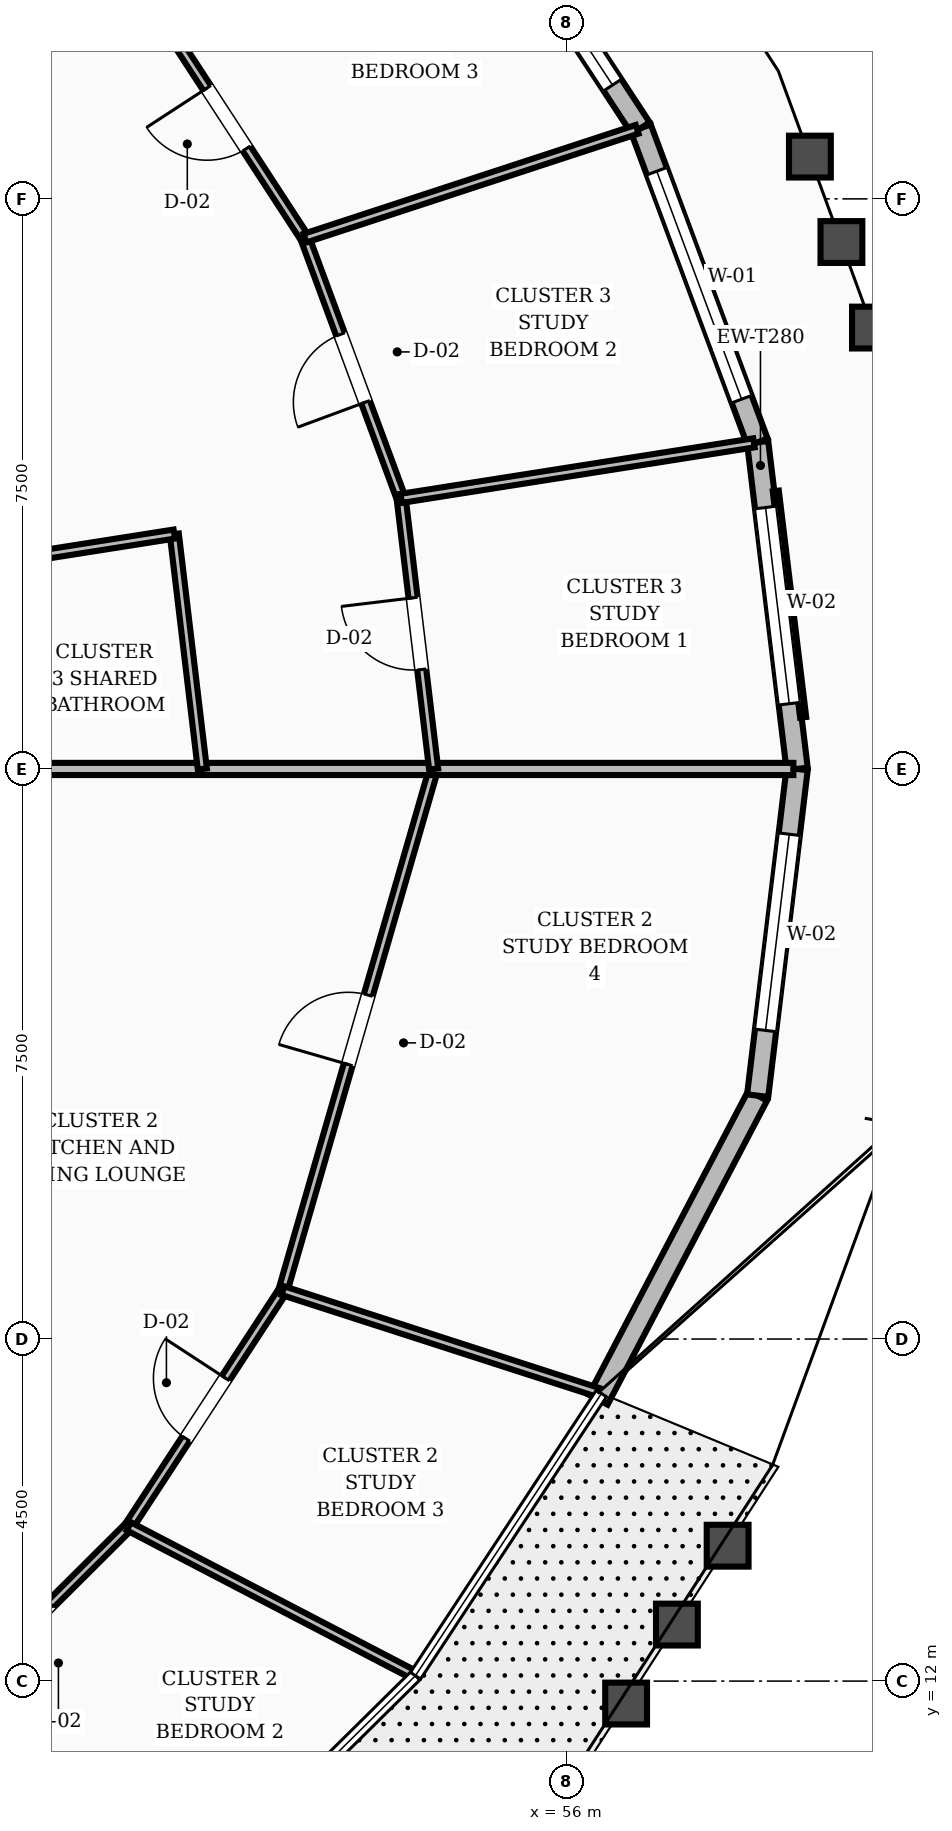
"""IFC4 building model, lengths in metres.
Left out: names, types, materials, properties, quantities, classifications, styles, units other than length and angle.
Written with IfcOpenShell. Run it as: python <this file> out.ifc"""

import sys

from ifc_helpers import new_model, si_unit, direction, frame, frame_2d, origin, place, context, subcontext, project, spatial, rectangle, extrude, element, fill, save


model = new_model("IFC4")
c1 = context("Model", 3, precision=1e-05, world=origin(), true_north=direction((0.0, 1.0)))
c2 = subcontext(c1, "Body", "Model", "MODEL_VIEW")
j1 = project(units=[si_unit("LENGTHUNIT", "METRE"), si_unit("PLANEANGLEUNIT", "RADIAN")], contexts=[c1])
p1 = place(None, origin())
s1 = spatial("IfcSite", under=j1, at=p1, CompositionType="ELEMENT")
p2 = place(p1, origin())
s2 = spatial("IfcBuilding", under=s1, at=p2, CompositionType="ELEMENT")
p3 = place(p2, frame((0.0, 0.0, 77.2)))
s3 = spatial("IfcBuildingStorey", under=s2, at=p3, CompositionType="ELEMENT", Elevation=77.2)
p4 = place(p3, frame((59.031, 24.0, 0.0), z_axis=(0.0, 0.0, 1.0), x_axis=(-0.119945698674, 0.992780453761, 0.0)))
e1 = element("IfcWall", 1, at=p4, inside=s3, PredefinedType="STANDARD", context=c2, shape_type="SweptSolid", body=[
    extrude(rectangle(XDim=4.329, YDim=0.28, at=frame_2d((2.165, 0.0))), origin(), (0.0, 0.0, 1.0), 2.71),
])
p5 = place(p4, frame((0.865, 0.0, 0.8)))
e2 = element("IfcOpeningElement", 2, at=p5, cuts=e1, PredefinedType="OPENING", context=c2, shape_type="SweptSolid", body=[
    extrude(rectangle(XDim=2.6, YDim=1.65, at=frame_2d((1.3, 0.825))), frame((0.0, 0.15, 0.0), z_axis=(0.0, -1.0, 0.0), x_axis=(1.0, 0.0, 0.0)), (0.0, 0.0, 1.0), 0.3),
])
p6 = place(p3, frame((58.511, 28.298, 0.0), z_axis=(0.0, 0.0, 1.0), x_axis=(-0.348859248306, 0.93717513031, 0.0)))
e3 = element("IfcWall", 3, at=p6, inside=s3, PredefinedType="STANDARD", context=c2, shape_type="SweptSolid", body=[
    extrude(rectangle(XDim=4.41, YDim=0.28, at=frame_2d((2.205, 0.0))), origin(), (0.0, 0.0, 1.0), 2.71),
])
p7 = place(p6, frame((0.605, 0.0, 0.8)))
e4 = element("IfcOpeningElement", 4, at=p7, cuts=e3, PredefinedType="OPENING", context=c2, shape_type="SweptSolid", body=[
    extrude(rectangle(XDim=3.2, YDim=1.65, at=frame_2d((1.6, 0.825))), frame((0.0, 0.15, 0.0), z_axis=(0.0, -1.0, 0.0), x_axis=(1.0, 0.0, 0.0)), (0.0, 0.0, 1.0), 0.3),
])
p8 = place(p3, frame((56.973, 32.431, 0.0), z_axis=(0.0, 0.0, 1.0), x_axis=(-0.548388300237, 0.836223817027, 0.0)))
e5 = element("IfcWall", 5, at=p8, inside=s3, PredefinedType="STANDARD", context=c2, shape_type="SweptSolid", body=[
    extrude(rectangle(XDim=4.555, YDim=0.28, at=frame_2d((2.277, 0.0))), origin(), (0.0, 0.0, 1.0), 2.71),
])
p9 = place(p8, frame((0.677, 0.0, 0.8)))
e6 = element("IfcOpeningElement", 6, at=p9, cuts=e5, PredefinedType="OPENING", context=c2, shape_type="SweptSolid", body=[
    extrude(rectangle(XDim=3.2, YDim=1.65, at=frame_2d((1.6, 0.825))), frame((0.0, 0.15, 0.0), z_axis=(0.0, -1.0, 0.0), x_axis=(1.0, 0.0, 0.0)), (0.0, 0.0, 1.0), 0.3),
])
p10 = place(p3, frame((56.413, 15.702, 0.0), z_axis=(0.0, 0.0, 1.0), x_axis=(0.46457646391, 0.885533008521, 0.0)))
e7 = element("IfcWall", 7, at=p10, inside=s3, PredefinedType="STANDARD", context=c2, shape_type="SweptSolid", body=[
    extrude(rectangle(XDim=4.517, YDim=0.28, at=frame_2d((2.258, 0.0))), origin(), (0.0, 0.0, 1.0), 2.71),
])
p11 = place(p3, frame((58.511, 19.702, 0.0), z_axis=(0.0, 0.0, 1.0), x_axis=(0.119945698674, 0.992780453761, 0.0)))
e8 = element("IfcWall", 8, at=p11, inside=s3, PredefinedType="STANDARD", context=c2, shape_type="SweptSolid", body=[
    extrude(rectangle(XDim=4.329, YDim=0.28, at=frame_2d((2.165, 0.0))), origin(), (0.0, 0.0, 1.0), 2.71),
])
p12 = place(p11, frame((0.865, 0.0, 0.8)))
e9 = element("IfcOpeningElement", 9, at=p12, cuts=e8, PredefinedType="OPENING", context=c2, shape_type="SweptSolid", body=[
    extrude(rectangle(XDim=2.6, YDim=1.65, at=frame_2d((1.3, 0.825))), frame((0.0, 0.15, 0.0), z_axis=(0.0, -1.0, 0.0), x_axis=(1.0, 0.0, 0.0)), (0.0, 0.0, 1.0), 0.3),
])
p13 = place(p3, frame((47.51, 11.318, 0.0), z_axis=(0.0, 0.0, 1.0), x_axis=(0.708405354772, 0.70580581843, 0.0)))
e10 = element("IfcWall", 10, at=p13, inside=s3, PredefinedType="PARTITIONING", context=c2, shape_type="SweptSolid", body=[
    extrude(rectangle(XDim=3.851, YDim=0.12, at=frame_2d((1.925, 0.0))), origin(), (0.0, 0.0, 1.0), 2.71),
])
p14 = place(p13, frame((1.45, 0.0, 0.0)))
e11 = element("IfcOpeningElement", 11, at=p14, cuts=e10, PredefinedType="OPENING", context=c2, shape_type="SweptSolid", body=[
    extrude(rectangle(XDim=0.95, YDim=2.1, at=frame_2d((0.475, 1.05))), frame((0.0, 0.07, 0.0), z_axis=(0.0, -1.0, 0.0), x_axis=(1.0, 0.0, 0.0)), (0.0, 0.0, 1.0), 0.14),
])
p15 = place(p3, frame((47.51, 11.318, 0.0), z_axis=(0.0, 0.0, 1.0), x_axis=(0.788634929873, -0.614861730297, 0.0)))
e12 = element("IfcWall", 12, at=p15, inside=s3, PredefinedType="PARTITIONING", context=c2, shape_type="SweptSolid", body=[
    extrude(rectangle(XDim=4.017, YDim=0.12, at=frame_2d((2.008, 0.0))), origin(), (0.0, 0.0, 1.0), 2.71),
])
p16 = place(p3, frame((50.238, 14.036, 0.0), z_axis=(0.0, 0.0, 1.0), x_axis=(0.547210297377, 0.836995155568, 0.0)))
e13 = element("IfcWall", 13, at=p16, inside=s3, PredefinedType="PARTITIONING", context=c2, shape_type="SweptSolid", body=[
    extrude(rectangle(XDim=3.704, YDim=0.12, at=frame_2d((1.852, 0.0))), origin(), (0.0, 0.0, 1.0), 2.71),
])
p17 = place(p16, frame((1.377, 0.0, 0.0)))
e14 = element("IfcOpeningElement", 14, at=p17, cuts=e13, PredefinedType="OPENING", context=c2, shape_type="SweptSolid", body=[
    extrude(rectangle(XDim=0.95, YDim=2.1, at=frame_2d((0.475, 1.05))), frame((0.0, 0.07, 0.0), z_axis=(0.0, -1.0, 0.0), x_axis=(1.0, 0.0, 0.0)), (0.0, 0.0, 1.0), 0.14),
])
p18 = place(p3, frame((50.238, 14.036, 0.0), z_axis=(0.0, 0.0, 1.0), x_axis=(0.886891273175, -0.461978213303, 0.0)))
e15 = element("IfcWall", 15, at=p18, inside=s3, PredefinedType="PARTITIONING", context=c2, shape_type="SweptSolid", body=[
    extrude(rectangle(XDim=4.202, YDim=0.12, at=frame_2d((2.101, 0.0))), origin(), (0.0, 0.0, 1.0), 2.71),
])
p19 = place(p3, frame((52.265, 17.137, 0.0), z_axis=(0.0, 0.0, 1.0), x_axis=(0.277595025379, 0.960698184595, 0.0)))
e16 = element("IfcWall", 16, at=p19, inside=s3, PredefinedType="PARTITIONING", context=c2, shape_type="SweptSolid", body=[
    extrude(rectangle(XDim=7.144, YDim=0.12, at=frame_2d((3.572, 0.0))), origin(), (0.0, 0.0, 1.0), 2.71),
])
p20 = place(p19, frame((3.097, 0.0, 0.0)))
e17 = element("IfcOpeningElement", 17, at=p20, cuts=e16, PredefinedType="OPENING", context=c2, shape_type="SweptSolid", body=[
    extrude(rectangle(XDim=0.95, YDim=2.1, at=frame_2d((0.475, 1.05))), frame((0.0, 0.07, 0.0), z_axis=(0.0, -1.0, 0.0), x_axis=(1.0, 0.0, 0.0)), (0.0, 0.0, 1.0), 0.14),
])
p21 = place(p3, frame((52.265, 17.137, 0.0), z_axis=(0.0, 0.0, 1.0), x_axis=(0.951624541118, -0.307263295467, 0.0)))
e18 = element("IfcWall", 18, at=p21, inside=s3, PredefinedType="PARTITIONING", context=c2, shape_type="SweptSolid", body=[
    extrude(rectangle(XDim=4.354, YDim=0.12, at=frame_2d((2.177, 0.0))), origin(), (0.0, 0.0, 1.0), 2.71),
])
p22 = place(p3, frame((48.162, 24.0, 0.0), z_axis=(0.0, 0.0, 1.0), x_axis=(1.0, 0.0, 0.0)))
e19 = element("IfcWall", 19, at=p22, inside=s3, PredefinedType="SOLIDWALL", context=c2, shape_type="SweptSolid", body=[
    extrude(rectangle(XDim=10.819, YDim=0.16, at=frame_2d((5.409, 0.0))), origin(), (0.0, 0.0, 1.0), 2.71),
])
p23 = place(p3, frame((51.205, 24.0, 0.0), z_axis=(0.0, 0.0, 1.0), x_axis=(-0.118529643461, 0.992950514185, 0.0)))
e20 = element("IfcWall", 20, at=p23, inside=s3, PredefinedType="PARTITIONING", context=c2, shape_type="SweptSolid", body=[
    extrude(rectangle(XDim=3.112, YDim=0.12, at=frame_2d((1.556, 0.0))), origin(), (0.0, 0.0, 1.0), 2.71),
])
p24 = place(p3, frame((47.852, 26.621, 0.0), z_axis=(0.0, 0.0, 1.0), x_axis=(0.987853214695, 0.155389916716, 0.0)))
e21 = element("IfcWall", 21, at=p24, inside=s3, PredefinedType="PARTITIONING", context=c2, shape_type="SweptSolid", body=[
    extrude(rectangle(XDim=3.021, YDim=0.12, at=frame_2d((1.511, 0.0))), origin(), (0.0, 0.0, 1.0), 2.71),
])
p25 = place(p24, frame((0.44, 0.0, 0.0)))
e22 = element("IfcOpeningElement", 22, at=p25, cuts=e21, PredefinedType="OPENING", context=c2, shape_type="SweptSolid", body=[
    extrude(rectangle(XDim=0.86, YDim=2.1, at=frame_2d((0.43, 1.05))), frame((0.0, 0.07, 0.0), z_axis=(0.0, -1.0, 0.0), x_axis=(1.0, 0.0, 0.0)), (0.0, 0.0, 1.0), 0.14),
])
p26 = place(p3, frame((54.248, 24.0, 0.0), z_axis=(0.0, 0.0, 1.0), x_axis=(-0.119223081784, 0.99286749205, 0.0)))
e23 = element("IfcWall", 23, at=p26, inside=s3, PredefinedType="PARTITIONING", context=c2, shape_type="SweptSolid", body=[
    extrude(rectangle(XDim=3.586, YDim=0.12, at=frame_2d((1.793, 0.0))), origin(), (0.0, 0.0, 1.0), 2.71),
])
p27 = place(p26, frame((1.318, 0.0, 0.0)))
e24 = element("IfcOpeningElement", 24, at=p27, cuts=e23, PredefinedType="OPENING", context=c2, shape_type="SweptSolid", body=[
    extrude(rectangle(XDim=0.95, YDim=2.1, at=frame_2d((0.475, 1.05))), frame((0.0, 0.07, 0.0), z_axis=(0.0, -1.0, 0.0), x_axis=(1.0, 0.0, 0.0)), (0.0, 0.0, 1.0), 0.14),
])
p28 = place(p3, frame((53.821, 27.56, 0.0), z_axis=(0.0, 0.0, 1.0), x_axis=(-0.34690473698, 0.937900369688, 0.0)))
e25 = element("IfcWall", 25, at=p28, inside=s3, PredefinedType="PARTITIONING", context=c2, shape_type="SweptSolid", body=[
    extrude(rectangle(XDim=3.65, YDim=0.12, at=frame_2d((1.825, 0.0))), origin(), (0.0, 0.0, 1.0), 2.71),
])
p29 = place(p28, frame((1.35, 0.0, 0.0)))
e26 = element("IfcOpeningElement", 26, at=p29, cuts=e25, PredefinedType="OPENING", context=c2, shape_type="SweptSolid", body=[
    extrude(rectangle(XDim=0.95, YDim=2.1, at=frame_2d((0.475, 1.05))), frame((0.0, 0.07, 0.0), z_axis=(0.0, -1.0, 0.0), x_axis=(1.0, 0.0, 0.0)), (0.0, 0.0, 1.0), 0.14),
])
p30 = place(p3, frame((53.821, 27.56, 0.0), z_axis=(0.0, 0.0, 1.0), x_axis=(0.987847508, 0.15542619129, 0.0)))
e27 = element("IfcWall", 27, at=p30, inside=s3, PredefinedType="PARTITIONING", context=c2, shape_type="SweptSolid", body=[
    extrude(rectangle(XDim=4.698, YDim=0.12, at=frame_2d((2.349, 0.0))), origin(), (0.0, 0.0, 1.0), 2.71),
])
p31 = place(p3, frame((52.555, 30.983, 0.0), z_axis=(0.0, 0.0, 1.0), x_axis=(-0.545947365594, 0.837819475783, 0.0)))
e28 = element("IfcWall", 28, at=p31, inside=s3, PredefinedType="PARTITIONING", context=c2, shape_type="SweptSolid", body=[
    extrude(rectangle(XDim=3.766, YDim=0.12, at=frame_2d((1.883, 0.0))), origin(), (0.0, 0.0, 1.0), 2.71),
])
p32 = place(p31, frame((1.408, 0.0, 0.0)))
e29 = element("IfcOpeningElement", 29, at=p32, cuts=e28, PredefinedType="OPENING", context=c2, shape_type="SweptSolid", body=[
    extrude(rectangle(XDim=0.95, YDim=2.1, at=frame_2d((0.475, 1.05))), frame((0.0, 0.07, 0.0), z_axis=(0.0, -1.0, 0.0), x_axis=(1.0, 0.0, 0.0)), (0.0, 0.0, 1.0), 0.14),
])
p33 = place(p3, frame((52.555, 30.983, 0.0), z_axis=(0.0, 0.0, 1.0), x_axis=(0.950305508021, 0.311318874186, 0.0)))
e30 = element("IfcWall", 30, at=p33, inside=s3, PredefinedType="PARTITIONING", context=c2, shape_type="SweptSolid", body=[
    extrude(rectangle(XDim=4.599, YDim=0.12, at=frame_2d((2.3, 0.0))), origin(), (0.0, 0.0, 1.0), 2.71),
])
p34 = place(p5, origin())
e31 = element("IfcWindow", 31, at=p34, inside=s3, PartitioningType="SINGLE_PANEL", PredefinedType="WINDOW", context=c2, shape_type="SweptSolid", body=[
    extrude(rectangle(XDim=2.6, YDim=1.65, at=frame_2d((1.3, 0.825))), frame((0.0, 0.03, 0.0), z_axis=(0.0, -1.0, 0.0), x_axis=(1.0, 0.0, 0.0)), (0.0, 0.0, 1.0), 0.06),
])
fill(e2, e31)
p35 = place(p7, origin())
e32 = element("IfcWindow", 32, at=p35, inside=s3, PartitioningType="SINGLE_PANEL", PredefinedType="WINDOW", context=c2, shape_type="SweptSolid", body=[
    extrude(rectangle(XDim=3.2, YDim=1.65, at=frame_2d((1.6, 0.825))), frame((0.0, 0.03, 0.0), z_axis=(0.0, -1.0, 0.0), x_axis=(1.0, 0.0, 0.0)), (0.0, 0.0, 1.0), 0.06),
])
fill(e4, e32)
p36 = place(p9, origin())
e33 = element("IfcWindow", 33, at=p36, inside=s3, PartitioningType="SINGLE_PANEL", PredefinedType="WINDOW", context=c2, shape_type="SweptSolid", body=[
    extrude(rectangle(XDim=3.2, YDim=1.65, at=frame_2d((1.6, 0.825))), frame((0.0, 0.03, 0.0), z_axis=(0.0, -1.0, 0.0), x_axis=(1.0, 0.0, 0.0)), (0.0, 0.0, 1.0), 0.06),
])
fill(e6, e33)
p37 = place(p12, origin())
e34 = element("IfcWindow", 34, at=p37, inside=s3, PartitioningType="SINGLE_PANEL", PredefinedType="WINDOW", context=c2, shape_type="SweptSolid", body=[
    extrude(rectangle(XDim=2.6, YDim=1.65, at=frame_2d((1.3, 0.825))), frame((0.0, 0.03, 0.0), z_axis=(0.0, -1.0, 0.0), x_axis=(1.0, 0.0, 0.0)), (0.0, 0.0, 1.0), 0.06),
])
fill(e9, e34)
p38 = place(p17, origin())
e35 = element("IfcDoor", 35, at=p38, inside=s3, OperationType="SINGLE_SWING_RIGHT", PredefinedType="DOOR", context=c2, shape_type="SweptSolid", body=[
    extrude(rectangle(XDim=0.95, YDim=2.1, at=frame_2d((0.475, 1.05))), frame((0.0, 0.025, 0.0), z_axis=(0.0, -1.0, 0.0), x_axis=(1.0, 0.0, 0.0)), (0.0, 0.0, 1.0), 0.05),
])
fill(e14, e35)
p39 = place(p20, origin())
e36 = element("IfcDoor", 36, at=p39, inside=s3, OperationType="SINGLE_SWING_LEFT", PredefinedType="DOOR", context=c2, shape_type="SweptSolid", body=[
    extrude(rectangle(XDim=0.95, YDim=2.1, at=frame_2d((0.475, 1.05))), frame((0.0, 0.025, 0.0), z_axis=(0.0, -1.0, 0.0), x_axis=(1.0, 0.0, 0.0)), (0.0, 0.0, 1.0), 0.05),
])
fill(e17, e36)
p40 = place(p27, origin())
e37 = element("IfcDoor", 37, at=p40, inside=s3, OperationType="SINGLE_SWING_RIGHT", PredefinedType="DOOR", context=c2, shape_type="SweptSolid", body=[
    extrude(rectangle(XDim=0.95, YDim=2.1, at=frame_2d((0.475, 1.05))), frame((0.0, 0.025, 0.0), z_axis=(0.0, -1.0, 0.0), x_axis=(1.0, 0.0, 0.0)), (0.0, 0.0, 1.0), 0.05),
])
fill(e24, e37)
p41 = place(p29, origin())
e38 = element("IfcDoor", 38, at=p41, inside=s3, OperationType="SINGLE_SWING_LEFT", PredefinedType="DOOR", context=c2, shape_type="SweptSolid", body=[
    extrude(rectangle(XDim=0.95, YDim=2.1, at=frame_2d((0.475, 1.05))), frame((0.0, 0.025, 0.0), z_axis=(0.0, -1.0, 0.0), x_axis=(1.0, 0.0, 0.0)), (0.0, 0.0, 1.0), 0.05),
])
fill(e26, e38)
p42 = place(p32, origin())
e39 = element("IfcDoor", 39, at=p42, inside=s3, OperationType="SINGLE_SWING_RIGHT", PredefinedType="DOOR", context=c2, shape_type="SweptSolid", body=[
    extrude(rectangle(XDim=0.95, YDim=2.1, at=frame_2d((0.475, 1.05))), frame((0.0, 0.025, 0.0), z_axis=(0.0, -1.0, 0.0), x_axis=(1.0, 0.0, 0.0)), (0.0, 0.0, 1.0), 0.05),
])
fill(e29, e39)
save(model, sys.argv[1])
